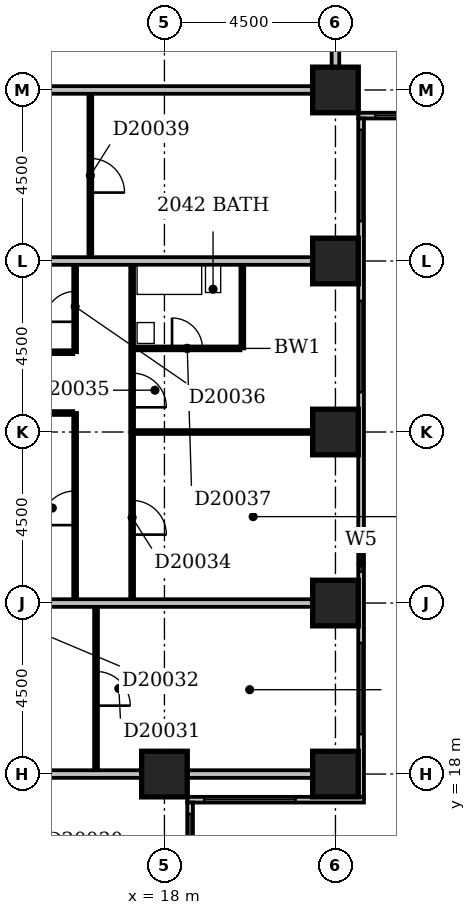
"""IFC4 building model, lengths in metres.
Left out: names, types, materials, properties, quantities, classifications, styles, units other than length and angle.
Written with IfcOpenShell. Run it as: python <this file> out.ifc"""

import sys

from ifc_helpers import new_model, si_unit, direction, frame, frame_2d, origin, origin_2d, place, context, subcontext, project, spatial, rectangle, extrude, element, fill, save


model = new_model("IFC4")
c1 = context("Model", 3, precision=1e-05, world=origin(), true_north=direction((0.0, 1.0)))
c2 = subcontext(c1, "Body", "Model", "MODEL_VIEW")
j1 = project(units=[si_unit("LENGTHUNIT", "METRE"), si_unit("PLANEANGLEUNIT", "RADIAN")], contexts=[c1])
p1 = place(None, origin())
s1 = spatial("IfcSite", under=j1, at=p1, CompositionType="ELEMENT")
p2 = place(p1, origin())
s2 = spatial("IfcBuilding", under=s1, at=p2, CompositionType="ELEMENT")
p3 = place(p2, frame((0.0, 0.0, 83.0)))
s3 = spatial("IfcBuildingStorey", under=s2, at=p3, CompositionType="ELEMENT", Elevation=83.0)
for number, where, z_axis, x_axis in (
    (1, (18.0, 18.0, -0.3), (0.0, 0.0, 1.0), (1.0, 0.0, 0.0)),
    (2, (22.5, 18.0, -0.3), (0.0, 0.0, 1.0), (1.0, 0.0, 0.0)),
    (3, (22.5, 22.5, -0.3), (0.0, 0.0, 1.0), (1.0, 0.0, 0.0)),
    (4, (22.5, 27.0, -0.3), (0.0, 0.0, 1.0), (1.0, 0.0, 0.0)),
    (5, (22.5, 31.5, -0.3), (0.0, 0.0, 1.0), (1.0, 0.0, 0.0)),
    (6, (22.5, 36.0, -0.3), (0.0, 0.0, 1.0), (1.0, 0.0, 0.0)),
):
    element("IfcColumn", number, at=place(p3, frame(where, z_axis=z_axis, x_axis=x_axis)), inside=s3, PredefinedType="COLUMN", context=c2, shape_type="SweptSolid", body=[
        extrude(rectangle(XDim=1.2, YDim=1.2, at=origin_2d()), origin(), (0.0, 0.0, 1.0), 3.6),
    ])
p4 = place(p3, frame((18.675, 8.4, 0.0), z_axis=(0.0, 0.0, 1.0), x_axis=(0.0, 1.0, 0.0)))
e7 = element("IfcWall", 7, at=p4, inside=s3, PredefinedType="STANDARD", context=c2, shape_type="SweptSolid", body=[
    extrude(rectangle(XDim=8.85, YDim=0.15, at=frame_2d((4.425, 0.0))), origin(), (0.0, 0.0, 1.0), 2.7),
])
p5 = place(p4, frame((1.542, 0.0, 0.6)))
e8 = element("IfcOpeningElement", 8, at=p5, cuts=e7, PredefinedType="OPENING", context=c2, shape_type="SweptSolid", body=[
    extrude(rectangle(XDim=1.5, YDim=1.8, at=frame_2d((0.75, 0.9))), frame((0.0, 0.087, 0.0), z_axis=(0.0, -1.0, 0.0), x_axis=(1.0, 0.0, 0.0)), (0.0, 0.0, 1.0), 0.174),
])
p6 = place(p4, frame((6.15, 0.0, 0.6)))
e9 = element("IfcOpeningElement", 9, at=p6, cuts=e7, PredefinedType="OPENING", context=c2, shape_type="SweptSolid", body=[
    extrude(rectangle(XDim=2.4, YDim=1.8, at=frame_2d((1.2, 0.9))), frame((0.0, 0.087, 0.0), z_axis=(0.0, -1.0, 0.0), x_axis=(1.0, 0.0, 0.0)), (0.0, 0.0, 1.0), 0.174),
])
p7 = place(p3, frame((18.6, 17.325, 0.0), z_axis=(0.0, 0.0, 1.0), x_axis=(1.0, 0.0, 0.0)))
e10 = element("IfcWall", 10, at=p7, inside=s3, PredefinedType="STANDARD", context=c2, shape_type="SweptSolid", body=[
    extrude(rectangle(XDim=4.65, YDim=0.15, at=frame_2d((2.325, 0.0))), origin(), (0.0, 0.0, 1.0), 2.7),
])
p8 = place(p7, frame((0.45, 0.0, 0.6)))
e11 = element("IfcOpeningElement", 11, at=p8, cuts=e10, PredefinedType="OPENING", context=c2, shape_type="SweptSolid", body=[
    extrude(rectangle(XDim=2.4, YDim=1.8, at=frame_2d((1.2, 0.9))), frame((0.0, 0.087, 0.0), z_axis=(0.0, -1.0, 0.0), x_axis=(1.0, 0.0, 0.0)), (0.0, 0.0, 1.0), 0.174),
])
p9 = place(p3, frame((23.175, 17.4, 0.0), z_axis=(0.0, 0.0, 1.0), x_axis=(0.0, 1.0, 0.0)))
e12 = element("IfcWall", 12, at=p9, inside=s3, PredefinedType="STANDARD", context=c2, shape_type="SweptSolid", body=[
    extrude(rectangle(XDim=17.85, YDim=0.15, at=frame_2d((8.925, 0.0))), origin(), (0.0, 0.0, 1.0), 2.7),
])
p10 = place(p9, frame((1.65, 0.0, 0.6)))
e13 = element("IfcOpeningElement", 13, at=p10, cuts=e12, PredefinedType="OPENING", context=c2, shape_type="SweptSolid", body=[
    extrude(rectangle(XDim=2.4, YDim=1.8, at=frame_2d((1.2, 0.9))), frame((0.0, 0.087, 0.0), z_axis=(0.0, -1.0, 0.0), x_axis=(1.0, 0.0, 0.0)), (0.0, 0.0, 1.0), 0.174),
])
p11 = place(p9, frame((5.926, 0.0, 0.6)))
e14 = element("IfcOpeningElement", 14, at=p11, cuts=e12, PredefinedType="OPENING", context=c2, shape_type="SweptSolid", body=[
    extrude(rectangle(XDim=0.45, YDim=1.8, at=frame_2d((0.225, 0.9))), frame((0.0, 0.087, 0.0), z_axis=(0.0, -1.0, 0.0), x_axis=(1.0, 0.0, 0.0)), (0.0, 0.0, 1.0), 0.174),
])
p12 = place(p9, frame((10.65, 0.0, 0.6)))
e15 = element("IfcOpeningElement", 15, at=p12, cuts=e12, PredefinedType="OPENING", context=c2, shape_type="SweptSolid", body=[
    extrude(rectangle(XDim=2.4, YDim=1.8, at=frame_2d((1.2, 0.9))), frame((0.0, 0.087, 0.0), z_axis=(0.0, -1.0, 0.0), x_axis=(1.0, 0.0, 0.0)), (0.0, 0.0, 1.0), 0.174),
])
p13 = place(p9, frame((15.15, 0.0, 0.6)))
e16 = element("IfcOpeningElement", 16, at=p13, cuts=e12, PredefinedType="OPENING", context=c2, shape_type="SweptSolid", body=[
    extrude(rectangle(XDim=2.4, YDim=1.8, at=frame_2d((1.2, 0.9))), frame((0.0, 0.087, 0.0), z_axis=(0.0, -1.0, 0.0), x_axis=(1.0, 0.0, 0.0)), (0.0, 0.0, 1.0), 0.174),
])
p14 = place(p3, frame((23.1, 35.325, 0.0), z_axis=(0.0, 0.0, 1.0), x_axis=(1.0, 0.0, 0.0)))
e17 = element("IfcWall", 17, at=p14, inside=s3, PredefinedType="STANDARD", context=c2, shape_type="SweptSolid", body=[
    extrude(rectangle(XDim=45.15, YDim=0.15, at=frame_2d((22.575, 0.0))), origin(), (0.0, 0.0, 1.0), 2.7),
])
p15 = place(p14, frame((0.45, 0.0, 0.6)))
e18 = element("IfcOpeningElement", 18, at=p15, cuts=e17, PredefinedType="OPENING", context=c2, shape_type="SweptSolid", body=[
    extrude(rectangle(XDim=2.4, YDim=1.8, at=frame_2d((1.2, 0.9))), frame((0.0, 0.087, 0.0), z_axis=(0.0, -1.0, 0.0), x_axis=(1.0, 0.0, 0.0)), (0.0, 0.0, 1.0), 0.174),
])
p16 = place(p14, frame((6.366, 0.0, 0.6)))
e19 = element("IfcOpeningElement", 19, at=p16, cuts=e17, PredefinedType="OPENING", context=c2, shape_type="SweptSolid", body=[
    extrude(rectangle(XDim=1.2, YDim=1.8, at=frame_2d((0.6, 0.9))), frame((0.0, 0.087, 0.0), z_axis=(0.0, -1.0, 0.0), x_axis=(1.0, 0.0, 0.0)), (0.0, 0.0, 1.0), 0.174),
])
p17 = place(p14, frame((9.45, 0.0, 0.6)))
e20 = element("IfcOpeningElement", 20, at=p17, cuts=e17, PredefinedType="OPENING", context=c2, shape_type="SweptSolid", body=[
    extrude(rectangle(XDim=2.4, YDim=1.8, at=frame_2d((1.2, 0.9))), frame((0.0, 0.087, 0.0), z_axis=(0.0, -1.0, 0.0), x_axis=(1.0, 0.0, 0.0)), (0.0, 0.0, 1.0), 0.174),
])
p18 = place(p14, frame((13.95, 0.0, 0.6)))
e21 = element("IfcOpeningElement", 21, at=p18, cuts=e17, PredefinedType="OPENING", context=c2, shape_type="SweptSolid", body=[
    extrude(rectangle(XDim=2.4, YDim=1.8, at=frame_2d((1.2, 0.9))), frame((0.0, 0.087, 0.0), z_axis=(0.0, -1.0, 0.0), x_axis=(1.0, 0.0, 0.0)), (0.0, 0.0, 1.0), 0.174),
])
p19 = place(p14, frame((18.21, 0.0, 0.6)))
e22 = element("IfcOpeningElement", 22, at=p19, cuts=e17, PredefinedType="OPENING", context=c2, shape_type="SweptSolid", body=[
    extrude(rectangle(XDim=1.8, YDim=1.8, at=frame_2d((0.9, 0.9))), frame((0.0, 0.087, 0.0), z_axis=(0.0, -1.0, 0.0), x_axis=(1.0, 0.0, 0.0)), (0.0, 0.0, 1.0), 0.174),
])
p20 = place(p14, frame((22.95, 0.0, 0.6)))
e23 = element("IfcOpeningElement", 23, at=p20, cuts=e17, PredefinedType="OPENING", context=c2, shape_type="SweptSolid", body=[
    extrude(rectangle(XDim=2.4, YDim=1.8, at=frame_2d((1.2, 0.9))), frame((0.0, 0.087, 0.0), z_axis=(0.0, -1.0, 0.0), x_axis=(1.0, 0.0, 0.0)), (0.0, 0.0, 1.0), 0.174),
])
p21 = place(p14, frame((27.45, 0.0, 0.6)))
e24 = element("IfcOpeningElement", 24, at=p21, cuts=e17, PredefinedType="OPENING", context=c2, shape_type="SweptSolid", body=[
    extrude(rectangle(XDim=2.4, YDim=1.8, at=frame_2d((1.2, 0.9))), frame((0.0, 0.087, 0.0), z_axis=(0.0, -1.0, 0.0), x_axis=(1.0, 0.0, 0.0)), (0.0, 0.0, 1.0), 0.174),
])
p22 = place(p14, frame((31.831, 0.0, 0.6)))
e25 = element("IfcOpeningElement", 25, at=p22, cuts=e17, PredefinedType="OPENING", context=c2, shape_type="SweptSolid", body=[
    extrude(rectangle(XDim=0.6, YDim=1.8, at=frame_2d((0.3, 0.9))), frame((0.0, 0.087, 0.0), z_axis=(0.0, -1.0, 0.0), x_axis=(1.0, 0.0, 0.0)), (0.0, 0.0, 1.0), 0.174),
])
p23 = place(p14, frame((36.45, 0.0, 0.6)))
e26 = element("IfcOpeningElement", 26, at=p23, cuts=e17, PredefinedType="OPENING", context=c2, shape_type="SweptSolid", body=[
    extrude(rectangle(XDim=2.4, YDim=1.8, at=frame_2d((1.2, 0.9))), frame((0.0, 0.087, 0.0), z_axis=(0.0, -1.0, 0.0), x_axis=(1.0, 0.0, 0.0)), (0.0, 0.0, 1.0), 0.174),
])
p24 = place(p14, frame((40.95, 0.0, 0.6)))
e27 = element("IfcOpeningElement", 27, at=p24, cuts=e17, PredefinedType="OPENING", context=c2, shape_type="SweptSolid", body=[
    extrude(rectangle(XDim=2.4, YDim=1.8, at=frame_2d((1.2, 0.9))), frame((0.0, 0.087, 0.0), z_axis=(0.0, -1.0, 0.0), x_axis=(1.0, 0.0, 0.0)), (0.0, 0.0, 1.0), 0.174),
])
p25 = place(p3, frame((9.1, 18.0, 0.0), z_axis=(0.0, 0.0, 1.0), x_axis=(1.0, 0.0, 0.0)))
e28 = element("IfcWall", 28, at=p25, inside=s3, PredefinedType="PARTITIONING", context=c2, shape_type="SweptSolid", body=[
    extrude(rectangle(XDim=8.3, YDim=0.2, at=frame_2d((4.15, 0.0))), origin(), (0.0, 0.0, 1.0), 2.6),
])
p26 = place(p3, frame((18.6, 18.0, 0.0), z_axis=(0.0, 0.0, 1.0), x_axis=(1.0, 0.0, 0.0)))
e29 = element("IfcWall", 29, at=p26, inside=s3, PredefinedType="PARTITIONING", context=c2, shape_type="SweptSolid", body=[
    extrude(rectangle(XDim=3.3, YDim=0.2, at=frame_2d((1.65, 0.0))), origin(), (0.0, 0.0, 1.0), 2.7),
])
p27 = place(p3, frame((16.2, 18.1, 0.0), z_axis=(0.0, 0.0, 1.0), x_axis=(0.0, 1.0, 0.0)))
e30 = element("IfcWall", 30, at=p27, inside=s3, PredefinedType="PARTITIONING", context=c2, shape_type="SweptSolid", body=[
    extrude(rectangle(XDim=4.3, YDim=0.1, at=frame_2d((2.15, 0.0))), origin(), (0.0, 0.0, 1.0), 3.3),
])
p28 = place(p27, frame((1.7, 0.0, 0.0)))
e31 = element("IfcOpeningElement", 31, at=p28, cuts=e30, PredefinedType="OPENING", context=c2, shape_type="SweptSolid", body=[
    extrude(rectangle(XDim=0.9, YDim=2.1, at=frame_2d((0.45, 1.05))), frame((0.0, 0.062, 0.0), z_axis=(0.0, -1.0, 0.0), x_axis=(1.0, 0.0, 0.0)), (0.0, 0.0, 1.0), 0.124),
])
p29 = place(p3, frame((9.1, 22.5, 0.0), z_axis=(0.0, 0.0, 1.0), x_axis=(1.0, 0.0, 0.0)))
e32 = element("IfcWall", 32, at=p29, inside=s3, PredefinedType="PARTITIONING", context=c2, shape_type="SweptSolid", body=[
    extrude(rectangle(XDim=12.8, YDim=0.2, at=frame_2d((6.4, 0.0))), origin(), (0.0, 0.0, 1.0), 3.3),
])
p30 = place(p3, frame((15.65, 22.6, 0.0), z_axis=(0.0, 0.0, 1.0), x_axis=(0.0, 1.0, 0.0)))
e33 = element("IfcWall", 33, at=p30, inside=s3, PredefinedType="PARTITIONING", context=c2, shape_type="SweptSolid", body=[
    extrude(rectangle(XDim=4.9, YDim=0.1, at=frame_2d((2.45, 0.0))), origin(), (0.0, 0.0, 1.0), 3.3),
])
p31 = place(p30, frame((1.95, 0.0, 0.0)))
e34 = element("IfcOpeningElement", 34, at=p31, cuts=e33, PredefinedType="OPENING", context=c2, shape_type="SweptSolid", body=[
    extrude(rectangle(XDim=0.9, YDim=2.1, at=frame_2d((0.45, 1.05))), frame((0.0, 0.062, 0.0), z_axis=(0.0, -1.0, 0.0), x_axis=(1.0, 0.0, 0.0)), (0.0, 0.0, 1.0), 0.124),
])
p32 = place(p3, frame((17.15, 22.6, 0.0), z_axis=(0.0, 0.0, 1.0), x_axis=(0.0, 1.0, 0.0)))
e35 = element("IfcWall", 35, at=p32, inside=s3, PredefinedType="PARTITIONING", context=c2, shape_type="SweptSolid", body=[
    extrude(rectangle(XDim=8.8, YDim=0.1, at=frame_2d((4.4, 0.0))), origin(), (0.0, 0.0, 1.0), 3.3),
])
p33 = place(p32, frame((1.7, 0.0, 0.0)))
e36 = element("IfcOpeningElement", 36, at=p33, cuts=e35, PredefinedType="OPENING", context=c2, shape_type="SweptSolid", body=[
    extrude(rectangle(XDim=0.9, YDim=2.1, at=frame_2d((0.45, 1.05))), frame((0.0, 0.062, 0.0), z_axis=(0.0, -1.0, 0.0), x_axis=(1.0, 0.0, 0.0)), (0.0, 0.0, 1.0), 0.124),
])
p34 = place(p32, frame((5.05, 0.0, 0.0)))
e37 = element("IfcOpeningElement", 37, at=p34, cuts=e35, PredefinedType="OPENING", context=c2, shape_type="SweptSolid", body=[
    extrude(rectangle(XDim=0.9, YDim=2.1, at=frame_2d((0.45, 1.05))), frame((0.0, 0.062, 0.0), z_axis=(0.0, -1.0, 0.0), x_axis=(1.0, 0.0, 0.0)), (0.0, 0.0, 1.0), 0.124),
])
p35 = place(p3, frame((17.2, 27.0, 0.0), z_axis=(0.0, 0.0, 1.0), x_axis=(1.0, 0.0, 0.0)))
e38 = element("IfcWall", 38, at=p35, inside=s3, PredefinedType="PARTITIONING", context=c2, shape_type="SweptSolid", body=[
    extrude(rectangle(XDim=4.7, YDim=0.1, at=frame_2d((2.35, 0.0))), origin(), (0.0, 0.0, 1.0), 2.7),
])
p36 = place(p3, frame((9.1, 27.5, 0.0), z_axis=(0.0, 0.0, 1.0), x_axis=(1.0, 0.0, 0.0)))
e39 = element("IfcWall", 39, at=p36, inside=s3, PredefinedType="PARTITIONING", context=c2, shape_type="SweptSolid", body=[
    extrude(rectangle(XDim=6.5, YDim=0.1, at=frame_2d((3.25, 0.0))), origin(), (0.0, 0.0, 1.0), 2.7),
])
p37 = place(p3, frame((9.1, 29.1, 0.0), z_axis=(0.0, 0.0, 1.0), x_axis=(1.0, 0.0, 0.0)))
e40 = element("IfcWall", 40, at=p37, inside=s3, PredefinedType="PLUMBINGWALL", context=c2, shape_type="SweptSolid", body=[
    extrude(rectangle(XDim=6.5, YDim=0.1, at=frame_2d((3.25, 0.0))), origin(), (0.0, 0.0, 1.0), 3.3),
])
p38 = place(p3, frame((15.65, 29.1, 0.0), z_axis=(0.0, 0.0, 1.0), x_axis=(0.0, 1.0, 0.0)))
e41 = element("IfcWall", 41, at=p38, inside=s3, PredefinedType="PARTITIONING", context=c2, shape_type="SweptSolid", body=[
    extrude(rectangle(XDim=2.3, YDim=0.1, at=frame_2d((1.15, 0.0))), origin(), (0.0, 0.0, 1.0), 3.3),
])
p39 = place(p38, frame((0.8, 0.0, 0.0)))
e42 = element("IfcOpeningElement", 42, at=p39, cuts=e41, PredefinedType="OPENING", context=c2, shape_type="SweptSolid", body=[
    extrude(rectangle(XDim=0.8, YDim=2.1, at=frame_2d((0.4, 1.05))), frame((0.0, 0.062, 0.0), z_axis=(0.0, -1.0, 0.0), x_axis=(1.0, 0.0, 0.0)), (0.0, 0.0, 1.0), 0.124),
])
p40 = place(p3, frame((17.2, 29.2, 0.0), z_axis=(0.0, 0.0, 1.0), x_axis=(1.0, 0.0, 0.0)))
e43 = element("IfcWall", 43, at=p40, inside=s3, PredefinedType="PLUMBINGWALL", context=c2, shape_type="SweptSolid", body=[
    extrude(rectangle(XDim=2.8, YDim=0.1, at=frame_2d((1.4, 0.0))), origin(), (0.0, 0.0, 1.0), 3.3),
])
p41 = place(p40, frame((1.0, 0.0, 0.0)))
e44 = element("IfcOpeningElement", 44, at=p41, cuts=e43, PredefinedType="OPENING", context=c2, shape_type="SweptSolid", body=[
    extrude(rectangle(XDim=0.8, YDim=2.1, at=frame_2d((0.4, 1.05))), frame((0.0, 0.062, 0.0), z_axis=(0.0, -1.0, 0.0), x_axis=(1.0, 0.0, 0.0)), (0.0, 0.0, 1.0), 0.124),
])
p42 = place(p3, frame((20.05, 29.2, 0.0), z_axis=(0.0, 0.0, 1.0), x_axis=(0.0, 1.0, 0.0)))
e45 = element("IfcWall", 45, at=p42, inside=s3, PredefinedType="PLUMBINGWALL", context=c2, shape_type="SweptSolid", body=[
    extrude(rectangle(XDim=2.2, YDim=0.1, at=frame_2d((1.1, 0.0))), origin(), (0.0, 0.0, 1.0), 3.3),
])
p43 = place(p3, frame((9.1, 31.5, 0.0), z_axis=(0.0, 0.0, 1.0), x_axis=(1.0, 0.0, 0.0)))
e46 = element("IfcWall", 46, at=p43, inside=s3, PredefinedType="PARTITIONING", context=c2, shape_type="SweptSolid", body=[
    extrude(rectangle(XDim=12.8, YDim=0.2, at=frame_2d((6.4, 0.0))), origin(), (0.0, 0.0, 1.0), 3.3),
])
p44 = place(p3, frame((16.05, 31.6, 0.0), z_axis=(0.0, 0.0, 1.0), x_axis=(0.0, 1.0, 0.0)))
e47 = element("IfcWall", 47, at=p44, inside=s3, PredefinedType="PARTITIONING", context=c2, shape_type="SweptSolid", body=[
    extrude(rectangle(XDim=4.3, YDim=0.1, at=frame_2d((2.15, 0.0))), origin(), (0.0, 0.0, 1.0), 3.3),
])
p45 = place(p44, frame((1.7, 0.0, 0.0)))
e48 = element("IfcOpeningElement", 48, at=p45, cuts=e47, PredefinedType="OPENING", context=c2, shape_type="SweptSolid", body=[
    extrude(rectangle(XDim=0.9, YDim=2.1, at=frame_2d((0.45, 1.05))), frame((0.0, 0.062, 0.0), z_axis=(0.0, -1.0, 0.0), x_axis=(1.0, 0.0, 0.0)), (0.0, 0.0, 1.0), 0.124),
])
p46 = place(p3, frame((9.1, 36.0, 0.0), z_axis=(0.0, 0.0, 1.0), x_axis=(1.0, 0.0, 0.0)))
e49 = element("IfcWall", 49, at=p46, inside=s3, PredefinedType="PARTITIONING", context=c2, shape_type="SweptSolid", body=[
    extrude(rectangle(XDim=12.8, YDim=0.2, at=frame_2d((6.4, 0.0))), origin(), (0.0, 0.0, 1.0), 2.4),
])
p47 = place(p3, frame((22.5, 36.6, 0.0), z_axis=(0.0, 0.0, 1.0), x_axis=(0.0, 1.0, 0.0)))
e50 = element("IfcWall", 50, at=p47, inside=s3, PredefinedType="PARTITIONING", context=c2, shape_type="SweptSolid", body=[
    extrude(rectangle(XDim=12.8, YDim=0.2, at=frame_2d((6.4, 0.0))), origin(), (0.0, 0.0, 1.0), 3.3),
])
p48 = place(p6, origin())
e51 = element("IfcWindow", 51, at=p48, inside=s3, PartitioningType="SINGLE_PANEL", PredefinedType="WINDOW", context=c2, shape_type="SweptSolid", body=[
    extrude(rectangle(XDim=2.4, YDim=1.8, at=frame_2d((1.2, 0.9))), frame((0.0, 0.03, 0.0), z_axis=(0.0, -1.0, 0.0), x_axis=(1.0, 0.0, 0.0)), (0.0, 0.0, 1.0), 0.06),
])
fill(e9, e51)
p49 = place(p8, origin())
e52 = element("IfcWindow", 52, at=p49, inside=s3, PartitioningType="SINGLE_PANEL", PredefinedType="WINDOW", context=c2, shape_type="SweptSolid", body=[
    extrude(rectangle(XDim=2.4, YDim=1.8, at=frame_2d((1.2, 0.9))), frame((0.0, 0.03, 0.0), z_axis=(0.0, -1.0, 0.0), x_axis=(1.0, 0.0, 0.0)), (0.0, 0.0, 1.0), 0.06),
])
fill(e11, e52)
p50 = place(p10, origin())
e53 = element("IfcWindow", 53, at=p50, inside=s3, PartitioningType="SINGLE_PANEL", PredefinedType="WINDOW", context=c2, shape_type="SweptSolid", body=[
    extrude(rectangle(XDim=2.4, YDim=1.8, at=frame_2d((1.2, 0.9))), frame((0.0, 0.03, 0.0), z_axis=(0.0, -1.0, 0.0), x_axis=(1.0, 0.0, 0.0)), (0.0, 0.0, 1.0), 0.06),
])
fill(e13, e53)
p51 = place(p11, origin())
e54 = element("IfcWindow", 54, at=p51, inside=s3, PartitioningType="SINGLE_PANEL", PredefinedType="WINDOW", context=c2, shape_type="SweptSolid", body=[
    extrude(rectangle(XDim=0.45, YDim=1.8, at=frame_2d((0.225, 0.9))), frame((0.0, 0.03, 0.0), z_axis=(0.0, -1.0, 0.0), x_axis=(1.0, 0.0, 0.0)), (0.0, 0.0, 1.0), 0.06),
])
fill(e14, e54)
p52 = place(p12, origin())
e55 = element("IfcWindow", 55, at=p52, inside=s3, PartitioningType="SINGLE_PANEL", PredefinedType="WINDOW", context=c2, shape_type="SweptSolid", body=[
    extrude(rectangle(XDim=2.4, YDim=1.8, at=frame_2d((1.2, 0.9))), frame((0.0, 0.03, 0.0), z_axis=(0.0, -1.0, 0.0), x_axis=(1.0, 0.0, 0.0)), (0.0, 0.0, 1.0), 0.06),
])
fill(e15, e55)
p53 = place(p13, origin())
e56 = element("IfcWindow", 56, at=p53, inside=s3, PartitioningType="SINGLE_PANEL", PredefinedType="WINDOW", context=c2, shape_type="SweptSolid", body=[
    extrude(rectangle(XDim=2.4, YDim=1.8, at=frame_2d((1.2, 0.9))), frame((0.0, 0.03, 0.0), z_axis=(0.0, -1.0, 0.0), x_axis=(1.0, 0.0, 0.0)), (0.0, 0.0, 1.0), 0.06),
])
fill(e16, e56)
p54 = place(p15, origin())
e57 = element("IfcWindow", 57, at=p54, inside=s3, PartitioningType="SINGLE_PANEL", PredefinedType="WINDOW", context=c2, shape_type="SweptSolid", body=[
    extrude(rectangle(XDim=2.4, YDim=1.8, at=frame_2d((1.2, 0.9))), frame((0.0, 0.03, 0.0), z_axis=(0.0, -1.0, 0.0), x_axis=(1.0, 0.0, 0.0)), (0.0, 0.0, 1.0), 0.06),
])
fill(e18, e57)
p55 = place(p28, frame((0.9, 0.0, 0.0), z_axis=(0.0, 0.0, 1.0), x_axis=(-1.0, 0.0, 0.0)))
e58 = element("IfcDoor", 58, at=p55, inside=s3, OperationType="SINGLE_SWING_RIGHT", PredefinedType="DOOR", context=c2, shape_type="SweptSolid", body=[
    extrude(rectangle(XDim=0.9, YDim=2.1, at=frame_2d((0.45, 1.05))), frame((0.0, 0.025, 0.0), z_axis=(0.0, -1.0, 0.0), x_axis=(1.0, 0.0, 0.0)), (0.0, 0.0, 1.0), 0.05),
])
fill(e31, e58)
p56 = place(p31, origin())
e59 = element("IfcDoor", 59, at=p56, inside=s3, OperationType="SINGLE_SWING_LEFT", PredefinedType="DOOR", context=c2, shape_type="SweptSolid", body=[
    extrude(rectangle(XDim=0.9, YDim=2.1, at=frame_2d((0.45, 1.05))), frame((0.0, 0.025, 0.0), z_axis=(0.0, -1.0, 0.0), x_axis=(1.0, 0.0, 0.0)), (0.0, 0.0, 1.0), 0.05),
])
fill(e34, e59)
p57 = place(p33, frame((0.9, 0.0, 0.0), z_axis=(0.0, 0.0, 1.0), x_axis=(-1.0, 0.0, 0.0)))
e60 = element("IfcDoor", 60, at=p57, inside=s3, OperationType="SINGLE_SWING_RIGHT", PredefinedType="DOOR", context=c2, shape_type="SweptSolid", body=[
    extrude(rectangle(XDim=0.9, YDim=2.1, at=frame_2d((0.45, 1.05))), frame((0.0, 0.025, 0.0), z_axis=(0.0, -1.0, 0.0), x_axis=(1.0, 0.0, 0.0)), (0.0, 0.0, 1.0), 0.05),
])
fill(e36, e60)
p58 = place(p34, frame((0.9, 0.0, 0.0), z_axis=(0.0, 0.0, 1.0), x_axis=(-1.0, 0.0, 0.0)))
e61 = element("IfcDoor", 61, at=p58, inside=s3, OperationType="SINGLE_SWING_RIGHT", PredefinedType="DOOR", context=c2, shape_type="SweptSolid", body=[
    extrude(rectangle(XDim=0.9, YDim=2.1, at=frame_2d((0.45, 1.05))), frame((0.0, 0.025, 0.0), z_axis=(0.0, -1.0, 0.0), x_axis=(1.0, 0.0, 0.0)), (0.0, 0.0, 1.0), 0.05),
])
fill(e37, e61)
p59 = place(p39, origin())
e62 = element("IfcDoor", 62, at=p59, inside=s3, OperationType="SINGLE_SWING_LEFT", PredefinedType="DOOR", context=c2, shape_type="SweptSolid", body=[
    extrude(rectangle(XDim=0.8, YDim=2.1, at=frame_2d((0.4, 1.05))), frame((0.0, 0.025, 0.0), z_axis=(0.0, -1.0, 0.0), x_axis=(1.0, 0.0, 0.0)), (0.0, 0.0, 1.0), 0.05),
])
fill(e42, e62)
p60 = place(p41, origin())
e63 = element("IfcDoor", 63, at=p60, inside=s3, OperationType="SINGLE_SWING_LEFT", PredefinedType="DOOR", context=c2, shape_type="SweptSolid", body=[
    extrude(rectangle(XDim=0.8, YDim=2.1, at=frame_2d((0.4, 1.05))), frame((0.0, 0.025, 0.0), z_axis=(0.0, -1.0, 0.0), x_axis=(1.0, 0.0, 0.0)), (0.0, 0.0, 1.0), 0.05),
])
fill(e44, e63)
p61 = place(p45, frame((0.9, 0.0, 0.0), z_axis=(0.0, 0.0, 1.0), x_axis=(-1.0, 0.0, 0.0)))
e64 = element("IfcDoor", 64, at=p61, inside=s3, OperationType="SINGLE_SWING_RIGHT", PredefinedType="DOOR", context=c2, shape_type="SweptSolid", body=[
    extrude(rectangle(XDim=0.9, YDim=2.1, at=frame_2d((0.45, 1.05))), frame((0.0, 0.025, 0.0), z_axis=(0.0, -1.0, 0.0), x_axis=(1.0, 0.0, 0.0)), (0.0, 0.0, 1.0), 0.05),
])
fill(e48, e64)
save(model, sys.argv[1])
